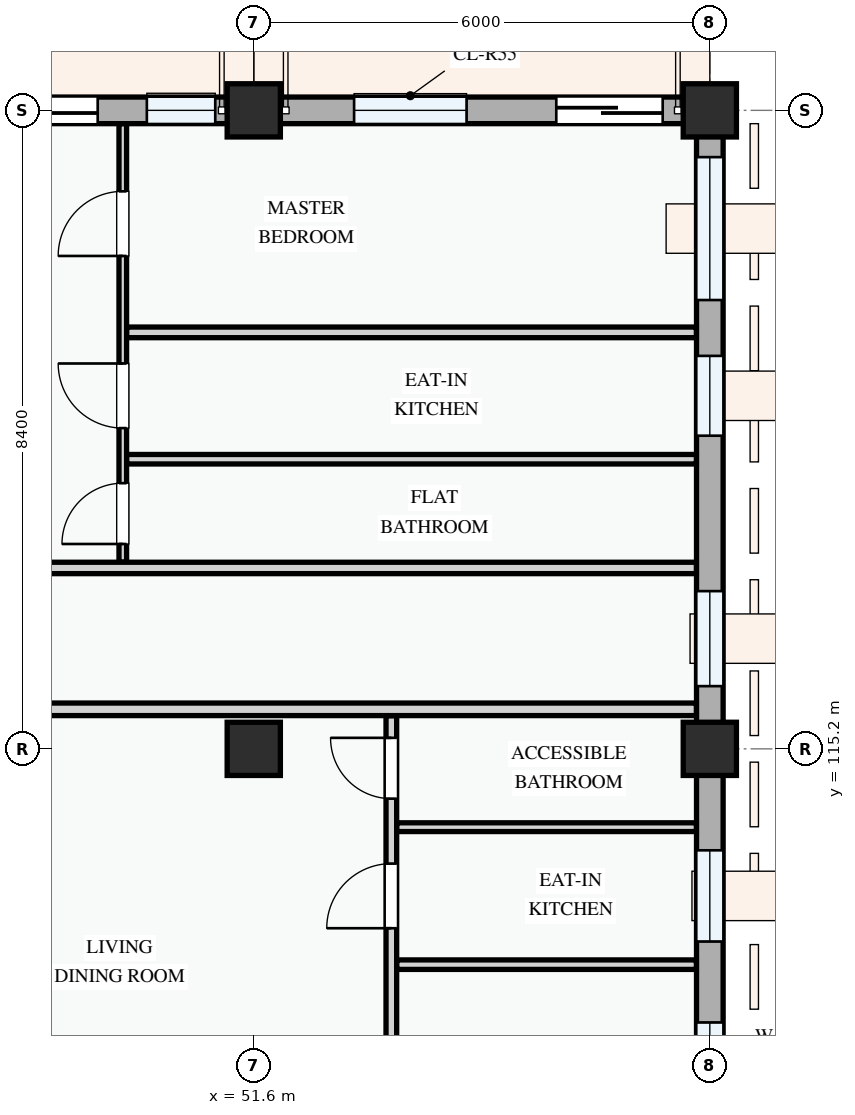
"""IFC4 building model, lengths in metres.
Left out: names, types, materials, properties, quantities, classifications, styles, units other than length and angle.
Written with IfcOpenShell. Run it as: python <this file> out.ifc"""

import sys

from ifc_helpers import new_model, si_unit, direction, frame, frame_2d, origin, origin_2d, place, context, subcontext, project, spatial, rectangle, extrude, element, fill, save


model = new_model("IFC4")
c1 = context("Model", 3, precision=1e-05, world=origin(), true_north=direction((0.0, 1.0)))
c2 = subcontext(c1, "Body", "Model", "MODEL_VIEW")
j1 = project(units=[si_unit("LENGTHUNIT", "METRE"), si_unit("PLANEANGLEUNIT", "RADIAN")], contexts=[c1])
p1 = place(None, origin())
s1 = spatial("IfcSite", under=j1, at=p1, CompositionType="ELEMENT")
p2 = place(p1, origin())
s2 = spatial("IfcBuilding", under=s1, at=p2, CompositionType="ELEMENT")
p3 = place(p2, frame((0.0, 0.0, 14.7)))
s3 = spatial("IfcBuildingStorey", under=s2, at=p3, CompositionType="ELEMENT", Elevation=14.7)
for number, where, z_axis, x_axis in (
    (1, (51.6, 115.2, 0.0), (0.0, 0.0, 1.0), (1.0, 0.0, 0.0)),
    (2, (51.6, 123.6, 0.0), (0.0, 0.0, 1.0), (1.0, 0.0, 0.0)),
    (3, (57.6, 115.2, 0.0), (0.0, 0.0, 1.0), (1.0, 0.0, 0.0)),
    (4, (57.6, 123.6, 0.0), (0.0, 0.0, 1.0), (1.0, 0.0, 0.0)),
):
    element("IfcColumn", number, at=place(p3, frame(where, z_axis=z_axis, x_axis=x_axis)), inside=s3, PredefinedType="COLUMN", context=c2, shape_type="SweptSolid", body=[
        extrude(rectangle(XDim=0.7, YDim=0.7, at=origin_2d()), origin(), (0.0, 0.0, 1.0), 3.3),
    ])
p4 = place(p3, frame((57.6, 109.2, 0.0), z_axis=(0.0, 0.0, 1.0), x_axis=(0.0, 1.0, 0.0)))
e5 = element("IfcWall", 5, at=p4, inside=s3, PredefinedType="STANDARD", context=c2, shape_type="SweptSolid", body=[
    extrude(rectangle(XDim=6.0, YDim=0.35, at=frame_2d((3.0, 0.0))), origin(), (0.0, 0.0, 1.0), 2.575),
])
p5 = place(p4, frame((0.95, 0.0, 0.78)))
e6 = element("IfcOpeningElement", 6, at=p5, cuts=e5, PredefinedType="OPENING", context=c2, shape_type="SweptSolid", body=[
    extrude(rectangle(XDim=1.45, YDim=1.6, at=frame_2d((0.725, 0.8))), frame((0.0, 0.185, 0.0), z_axis=(0.0, -1.0, 0.0), x_axis=(1.0, 0.0, 0.0)), (0.0, 0.0, 1.0), 0.37),
])
p6 = place(p4, frame((3.465, 0.0, 0.78)))
e7 = element("IfcOpeningElement", 7, at=p6, cuts=e5, PredefinedType="OPENING", context=c2, shape_type="SweptSolid", body=[
    extrude(rectangle(XDim=1.2, YDim=1.35, at=frame_2d((0.6, 0.675))), frame((0.0, 0.185, 0.0), z_axis=(0.0, -1.0, 0.0), x_axis=(1.0, 0.0, 0.0)), (0.0, 0.0, 1.0), 0.37),
])
p7 = place(p3, frame((57.6, 115.2, 0.0), z_axis=(0.0, 0.0, 1.0), x_axis=(0.0, 1.0, 0.0)))
e8 = element("IfcWall", 8, at=p7, inside=s3, PredefinedType="STANDARD", context=c2, shape_type="SweptSolid", body=[
    extrude(rectangle(XDim=8.4, YDim=0.35, at=frame_2d((4.2, 0.0))), origin(), (0.0, 0.0, 1.0), 2.425),
])
p8 = place(p7, frame((0.825, 0.0, 0.78)))
e9 = element("IfcOpeningElement", 9, at=p8, cuts=e8, PredefinedType="OPENING", context=c2, shape_type="SweptSolid", body=[
    extrude(rectangle(XDim=1.25, YDim=1.3, at=frame_2d((0.625, 0.65))), frame((0.0, 0.185, 0.0), z_axis=(0.0, -1.0, 0.0), x_axis=(1.0, 0.0, 0.0)), (0.0, 0.0, 1.0), 0.37),
])
p9 = place(p7, frame((4.12, 0.0, 0.78)))
e10 = element("IfcOpeningElement", 10, at=p9, cuts=e8, PredefinedType="OPENING", context=c2, shape_type="SweptSolid", body=[
    extrude(rectangle(XDim=1.05, YDim=1.2, at=frame_2d((0.525, 0.6))), frame((0.0, 0.185, 0.0), z_axis=(0.0, -1.0, 0.0), x_axis=(1.0, 0.0, 0.0)), (0.0, 0.0, 1.0), 0.37),
])
p10 = place(p7, frame((5.905, 0.0, 0.78)))
e11 = element("IfcOpeningElement", 11, at=p10, cuts=e8, PredefinedType="OPENING", context=c2, shape_type="SweptSolid", body=[
    extrude(rectangle(XDim=1.88, YDim=1.52, at=frame_2d((0.94, 0.76))), frame((0.0, 0.185, 0.0), z_axis=(0.0, -1.0, 0.0), x_axis=(1.0, 0.0, 0.0)), (0.0, 0.0, 1.0), 0.37),
])
p11 = place(p3, frame((57.6, 123.6, 0.0), z_axis=(0.0, 0.0, 1.0), x_axis=(-1.0, 0.0, 0.0)))
e12 = element("IfcWall", 12, at=p11, inside=s3, PredefinedType="STANDARD", context=c2, shape_type="SweptSolid", body=[
    extrude(rectangle(XDim=6.0, YDim=0.35, at=frame_2d((3.0, 0.0))), origin(), (0.0, 0.0, 1.0), 2.445),
])
p12 = place(p11, frame((0.62, 0.0, 0.0)))
e13 = element("IfcOpeningElement", 13, at=p12, cuts=e12, PredefinedType="OPENING", context=c2, shape_type="SweptSolid", body=[
    extrude(rectangle(XDim=1.4, YDim=2.2, at=frame_2d((0.7, 1.1))), frame((0.0, 0.185, 0.0), z_axis=(0.0, -1.0, 0.0), x_axis=(1.0, 0.0, 0.0)), (0.0, 0.0, 1.0), 0.37),
])
p13 = place(p11, frame((3.2, 0.0, 0.78)))
e14 = element("IfcOpeningElement", 14, at=p13, cuts=e12, PredefinedType="OPENING", context=c2, shape_type="SweptSolid", body=[
    extrude(rectangle(XDim=1.48, YDim=1.52, at=frame_2d((0.74, 0.76))), frame((0.0, 0.185, 0.0), z_axis=(0.0, -1.0, 0.0), x_axis=(1.0, 0.0, 0.0)), (0.0, 0.0, 1.0), 0.37),
])
p14 = place(p3, frame((51.6, 123.6, 0.0), z_axis=(0.0, 0.0, 1.0), x_axis=(-1.0, 0.0, 0.0)))
e15 = element("IfcWall", 15, at=p14, inside=s3, PredefinedType="STANDARD", context=c2, shape_type="SweptSolid", body=[
    extrude(rectangle(XDim=8.4, YDim=0.35, at=frame_2d((4.2, 0.0))), origin(), (0.0, 0.0, 1.0), 2.345),
])
p15 = place(p14, frame((2.053, 0.0, 0.0)))
e16 = element("IfcOpeningElement", 16, at=p15, cuts=e15, PredefinedType="OPENING", context=c2, shape_type="SweptSolid", body=[
    extrude(rectangle(XDim=1.5, YDim=2.2, at=frame_2d((0.75, 1.1))), frame((0.0, 0.185, 0.0), z_axis=(0.0, -1.0, 0.0), x_axis=(1.0, 0.0, 0.0)), (0.0, 0.0, 1.0), 0.37),
])
p16 = place(p14, frame((0.507, 0.0, 0.78)))
e17 = element("IfcOpeningElement", 17, at=p16, cuts=e15, PredefinedType="OPENING", context=c2, shape_type="SweptSolid", body=[
    extrude(rectangle(XDim=0.9, YDim=1.2, at=frame_2d((0.45, 0.6))), frame((0.0, 0.185, 0.0), z_axis=(0.0, -1.0, 0.0), x_axis=(1.0, 0.0, 0.0)), (0.0, 0.0, 1.0), 0.37),
])
p17 = place(p14, frame((4.137, 0.0, 0.78)))
e18 = element("IfcOpeningElement", 18, at=p17, cuts=e15, PredefinedType="OPENING", context=c2, shape_type="SweptSolid", body=[
    extrude(rectangle(XDim=1.05, YDim=1.2, at=frame_2d((0.525, 0.6))), frame((0.0, 0.185, 0.0), z_axis=(0.0, -1.0, 0.0), x_axis=(1.0, 0.0, 0.0)), (0.0, 0.0, 1.0), 0.37),
])
p18 = place(p14, frame((6.155, 0.0, 0.78)))
e19 = element("IfcOpeningElement", 19, at=p18, cuts=e15, PredefinedType="OPENING", context=c2, shape_type="SweptSolid", body=[
    extrude(rectangle(XDim=1.62, YDim=1.38, at=frame_2d((0.81, 0.69))), frame((0.0, 0.185, 0.0), z_axis=(0.0, -1.0, 0.0), x_axis=(1.0, 0.0, 0.0)), (0.0, 0.0, 1.0), 0.37),
])
p19 = place(p3, frame((53.41, 109.377, 0.0), z_axis=(0.0, 0.0, 1.0), x_axis=(0.0, 1.0, 0.0)))
e20 = element("IfcWall", 20, at=p19, inside=s3, PredefinedType="PARTITIONING", context=c2, shape_type="SweptSolid", body=[
    extrude(rectangle(XDim=6.259, YDim=0.14, at=frame_2d((3.129, 0.0))), origin(), (0.0, 0.0, 1.0), 3.0),
])
p20 = place(p19, frame((1.008, 0.0, 0.0)))
e21 = element("IfcOpeningElement", 21, at=p20, cuts=e20, PredefinedType="OPENING", context=c2, shape_type="SweptSolid", body=[
    extrude(rectangle(XDim=0.85, YDim=2.1, at=frame_2d((0.425, 1.05))), frame((0.0, 0.08, 0.0), z_axis=(0.0, -1.0, 0.0), x_axis=(1.0, 0.0, 0.0)), (0.0, 0.0, 1.0), 0.16),
])
p21 = place(p19, frame((3.463, 0.0, 0.0)))
e22 = element("IfcOpeningElement", 22, at=p21, cuts=e20, PredefinedType="OPENING", context=c2, shape_type="SweptSolid", body=[
    extrude(rectangle(XDim=0.85, YDim=2.1, at=frame_2d((0.425, 1.05))), frame((0.0, 0.08, 0.0), z_axis=(0.0, -1.0, 0.0), x_axis=(1.0, 0.0, 0.0)), (0.0, 0.0, 1.0), 0.16),
])
p22 = place(p19, frame((5.168, 0.0, 0.0)))
e23 = element("IfcOpeningElement", 23, at=p22, cuts=e20, PredefinedType="OPENING", context=c2, shape_type="SweptSolid", body=[
    extrude(rectangle(XDim=0.8, YDim=2.1, at=frame_2d((0.4, 1.05))), frame((0.0, 0.08, 0.0), z_axis=(0.0, -1.0, 0.0), x_axis=(1.0, 0.0, 0.0)), (0.0, 0.0, 1.0), 0.16),
])
p23 = place(p3, frame((53.482, 112.361, 0.0), z_axis=(0.0, 0.0, 1.0), x_axis=(1.0, 0.0, 0.0)))
e24 = element("IfcWall", 24, at=p23, inside=s3, PredefinedType="PARTITIONING", context=c2, shape_type="SweptSolid", body=[
    extrude(rectangle(XDim=3.941, YDim=0.125, at=frame_2d((1.971, 0.0))), origin(), (0.0, 0.0, 1.0), 3.0),
])
p24 = place(p3, frame((53.482, 114.17, 0.0), z_axis=(0.0, 0.0, 1.0), x_axis=(1.0, 0.0, 0.0)))
e25 = element("IfcWall", 25, at=p24, inside=s3, PredefinedType="PARTITIONING", context=c2, shape_type="SweptSolid", body=[
    extrude(rectangle(XDim=3.941, YDim=0.115, at=frame_2d((1.971, 0.0))), origin(), (0.0, 0.0, 1.0), 3.0),
])
p25 = place(p3, frame((49.877, 117.657, 0.0), z_axis=(0.0, 0.0, 1.0), x_axis=(0.0, 1.0, 0.0)))
e26 = element("IfcWall", 26, at=p25, inside=s3, PredefinedType="PARTITIONING", context=c2, shape_type="SweptSolid", body=[
    extrude(rectangle(XDim=5.766, YDim=0.1, at=frame_2d((2.883, 0.0))), origin(), (0.0, 0.0, 1.0), 3.0),
])
p26 = place(p25, frame((0.238, 0.0, 0.0)))
e27 = element("IfcOpeningElement", 27, at=p26, cuts=e26, PredefinedType="OPENING", context=c2, shape_type="SweptSolid", body=[
    extrude(rectangle(XDim=0.8, YDim=2.1, at=frame_2d((0.4, 1.05))), frame((0.0, 0.06, 0.0), z_axis=(0.0, -1.0, 0.0), x_axis=(1.0, 0.0, 0.0)), (0.0, 0.0, 1.0), 0.12),
])
p27 = place(p25, frame((1.763, 0.0, 0.0)))
e28 = element("IfcOpeningElement", 28, at=p27, cuts=e26, PredefinedType="OPENING", context=c2, shape_type="SweptSolid", body=[
    extrude(rectangle(XDim=0.85, YDim=2.1, at=frame_2d((0.425, 1.05))), frame((0.0, 0.06, 0.0), z_axis=(0.0, -1.0, 0.0), x_axis=(1.0, 0.0, 0.0)), (0.0, 0.0, 1.0), 0.12),
])
p28 = place(p25, frame((4.028, 0.0, 0.0)))
e29 = element("IfcOpeningElement", 29, at=p28, cuts=e26, PredefinedType="OPENING", context=c2, shape_type="SweptSolid", body=[
    extrude(rectangle(XDim=0.85, YDim=2.1, at=frame_2d((0.425, 1.05))), frame((0.0, 0.06, 0.0), z_axis=(0.0, -1.0, 0.0), x_axis=(1.0, 0.0, 0.0)), (0.0, 0.0, 1.0), 0.12),
])
p29 = place(p3, frame((49.929, 120.679, 0.0), z_axis=(0.0, 0.0, 1.0), x_axis=(1.0, 0.0, 0.0)))
e30 = element("IfcWall", 30, at=p29, inside=s3, PredefinedType="PARTITIONING", context=c2, shape_type="SweptSolid", body=[
    extrude(rectangle(XDim=7.494, YDim=0.14, at=frame_2d((3.747, 0.0))), origin(), (0.0, 0.0, 1.0), 3.0),
])
p30 = place(p3, frame((49.929, 119.01, 0.0), z_axis=(0.0, 0.0, 1.0), x_axis=(1.0, 0.0, 0.0)))
e31 = element("IfcWall", 31, at=p30, inside=s3, PredefinedType="PARTITIONING", context=c2, shape_type="SweptSolid", body=[
    extrude(rectangle(XDim=7.494, YDim=0.125, at=frame_2d((3.747, 0.0))), origin(), (0.0, 0.0, 1.0), 3.0),
])
p31 = place(p3, frame((25.15, 115.72, 0.0), z_axis=(0.0, 0.0, 1.0), x_axis=(1.0, 0.0, 0.0)))
e32 = element("IfcWall", 32, at=p31, inside=s3, PredefinedType="PARTITIONING", context=c2, shape_type="SweptSolid", body=[
    extrude(rectangle(XDim=32.273, YDim=0.165, at=frame_2d((16.137, 0.0))), origin(), (0.0, 0.0, 1.0), 3.0),
])
p32 = place(p31, frame((0.25, 0.0, 0.0)))
e33 = element("IfcOpeningElement", 33, at=p32, cuts=e32, PredefinedType="OPENING", context=c2, shape_type="SweptSolid", body=[
    extrude(rectangle(XDim=0.92, YDim=2.1, at=frame_2d((0.46, 1.05))), frame((0.0, 0.093, 0.0), z_axis=(0.0, -1.0, 0.0), x_axis=(1.0, 0.0, 0.0)), (0.0, 0.0, 1.0), 0.185),
])
p33 = place(p31, frame((14.015, 0.0, 0.0)))
e34 = element("IfcOpeningElement", 34, at=p33, cuts=e32, PredefinedType="OPENING", context=c2, shape_type="SweptSolid", body=[
    extrude(rectangle(XDim=0.92, YDim=2.1, at=frame_2d((0.46, 1.05))), frame((0.0, 0.093, 0.0), z_axis=(0.0, -1.0, 0.0), x_axis=(1.0, 0.0, 0.0)), (0.0, 0.0, 1.0), 0.185),
])
p34 = place(p31, frame((21.739, 0.0, 0.0)))
e35 = element("IfcOpeningElement", 35, at=p34, cuts=e32, PredefinedType="OPENING", context=c2, shape_type="SweptSolid", body=[
    extrude(rectangle(XDim=0.92, YDim=2.1, at=frame_2d((0.46, 1.05))), frame((0.0, 0.093, 0.0), z_axis=(0.0, -1.0, 0.0), x_axis=(1.0, 0.0, 0.0)), (0.0, 0.0, 1.0), 0.185),
])
p35 = place(p3, frame((22.66, 117.58, 0.0), z_axis=(0.0, 0.0, 1.0), x_axis=(1.0, 0.0, 0.0)))
e36 = element("IfcWall", 36, at=p35, inside=s3, PredefinedType="PARTITIONING", context=c2, shape_type="SweptSolid", body=[
    extrude(rectangle(XDim=34.763, YDim=0.15, at=frame_2d((17.382, 0.0))), origin(), (0.0, 0.0, 1.0), 3.0),
])
p36 = place(p35, frame((2.74, 0.0, 0.0)))
e37 = element("IfcOpeningElement", 37, at=p36, cuts=e36, PredefinedType="OPENING", context=c2, shape_type="SweptSolid", body=[
    extrude(rectangle(XDim=0.96, YDim=2.12, at=frame_2d((0.48, 1.06))), frame((0.0, 0.085, 0.0), z_axis=(0.0, -1.0, 0.0), x_axis=(1.0, 0.0, 0.0)), (0.0, 0.0, 1.0), 0.17),
])
p37 = place(p35, frame((16.285, 0.0, 0.0)))
e38 = element("IfcOpeningElement", 38, at=p37, cuts=e36, PredefinedType="OPENING", context=c2, shape_type="SweptSolid", body=[
    extrude(rectangle(XDim=0.92, YDim=2.1, at=frame_2d((0.46, 1.05))), frame((0.0, 0.085, 0.0), z_axis=(0.0, -1.0, 0.0), x_axis=(1.0, 0.0, 0.0)), (0.0, 0.0, 1.0), 0.17),
])
p38 = place(p35, frame((24.263, 0.0, 0.0)))
e39 = element("IfcOpeningElement", 39, at=p38, cuts=e36, PredefinedType="OPENING", context=c2, shape_type="SweptSolid", body=[
    extrude(rectangle(XDim=0.92, YDim=2.1, at=frame_2d((0.46, 1.05))), frame((0.0, 0.085, 0.0), z_axis=(0.0, -1.0, 0.0), x_axis=(1.0, 0.0, 0.0)), (0.0, 0.0, 1.0), 0.17),
])
p39 = place(p5, origin())
e40 = element("IfcWindow", 40, at=p39, inside=s3, PartitioningType="SINGLE_PANEL", PredefinedType="WINDOW", context=c2, shape_type="SweptSolid", body=[
    extrude(rectangle(XDim=1.45, YDim=1.6, at=frame_2d((0.725, 0.8))), frame((0.0, 0.03, 0.0), z_axis=(0.0, -1.0, 0.0), x_axis=(1.0, 0.0, 0.0)), (0.0, 0.0, 1.0), 0.06),
])
fill(e6, e40)
p40 = place(p6, origin())
e41 = element("IfcWindow", 41, at=p40, inside=s3, PartitioningType="SINGLE_PANEL", PredefinedType="WINDOW", context=c2, shape_type="SweptSolid", body=[
    extrude(rectangle(XDim=1.2, YDim=1.35, at=frame_2d((0.6, 0.675))), frame((0.0, 0.03, 0.0), z_axis=(0.0, -1.0, 0.0), x_axis=(1.0, 0.0, 0.0)), (0.0, 0.0, 1.0), 0.06),
])
fill(e7, e41)
p41 = place(p8, origin())
e42 = element("IfcWindow", 42, at=p41, inside=s3, PartitioningType="SINGLE_PANEL", PredefinedType="WINDOW", context=c2, shape_type="SweptSolid", body=[
    extrude(rectangle(XDim=1.25, YDim=1.3, at=frame_2d((0.625, 0.65))), frame((0.0, 0.03, 0.0), z_axis=(0.0, -1.0, 0.0), x_axis=(1.0, 0.0, 0.0)), (0.0, 0.0, 1.0), 0.06),
])
fill(e9, e42)
p42 = place(p9, origin())
e43 = element("IfcWindow", 43, at=p42, inside=s3, PartitioningType="SINGLE_PANEL", PredefinedType="WINDOW", context=c2, shape_type="SweptSolid", body=[
    extrude(rectangle(XDim=1.05, YDim=1.2, at=frame_2d((0.525, 0.6))), frame((0.0, 0.03, 0.0), z_axis=(0.0, -1.0, 0.0), x_axis=(1.0, 0.0, 0.0)), (0.0, 0.0, 1.0), 0.06),
])
fill(e10, e43)
p43 = place(p10, origin())
e44 = element("IfcWindow", 44, at=p43, inside=s3, PartitioningType="DOUBLE_PANEL_VERTICAL", PredefinedType="WINDOW", context=c2, shape_type="SweptSolid", body=[
    extrude(rectangle(XDim=1.88, YDim=1.52, at=frame_2d((0.94, 0.76))), frame((0.0, 0.03, 0.0), z_axis=(0.0, -1.0, 0.0), x_axis=(1.0, 0.0, 0.0)), (0.0, 0.0, 1.0), 0.06),
])
fill(e11, e44)
p44 = place(p12, frame((1.4, 0.0, 0.0), z_axis=(0.0, 0.0, 1.0), x_axis=(-1.0, 0.0, 0.0)))
e45 = element("IfcDoor", 45, at=p44, inside=s3, OperationType="SLIDING_TO_LEFT", PredefinedType="DOOR", context=c2, shape_type="SweptSolid", body=[
    extrude(rectangle(XDim=1.4, YDim=2.2, at=frame_2d((0.7, 1.1))), frame((0.0, 0.025, 0.0), z_axis=(0.0, -1.0, 0.0), x_axis=(1.0, 0.0, 0.0)), (0.0, 0.0, 1.0), 0.05),
])
fill(e13, e45)
p45 = place(p13, origin())
e46 = element("IfcWindow", 46, at=p45, inside=s3, PartitioningType="SINGLE_PANEL", PredefinedType="WINDOW", context=c2, shape_type="SweptSolid", body=[
    extrude(rectangle(XDim=1.48, YDim=1.52, at=frame_2d((0.74, 0.76))), frame((0.0, 0.03, 0.0), z_axis=(0.0, -1.0, 0.0), x_axis=(1.0, 0.0, 0.0)), (0.0, 0.0, 1.0), 0.06),
])
fill(e14, e46)
p46 = place(p15, frame((1.5, 0.0, 0.0), z_axis=(0.0, 0.0, 1.0), x_axis=(-1.0, 0.0, 0.0)))
e47 = element("IfcDoor", 47, at=p46, inside=s3, OperationType="SLIDING_TO_RIGHT", PredefinedType="DOOR", context=c2, shape_type="SweptSolid", body=[
    extrude(rectangle(XDim=1.5, YDim=2.2, at=frame_2d((0.75, 1.1))), frame((0.0, 0.025, 0.0), z_axis=(0.0, -1.0, 0.0), x_axis=(1.0, 0.0, 0.0)), (0.0, 0.0, 1.0), 0.05),
])
fill(e16, e47)
p47 = place(p16, origin())
e48 = element("IfcWindow", 48, at=p47, inside=s3, PartitioningType="SINGLE_PANEL", PredefinedType="WINDOW", context=c2, shape_type="SweptSolid", body=[
    extrude(rectangle(XDim=0.9, YDim=1.2, at=frame_2d((0.45, 0.6))), frame((0.0, 0.03, 0.0), z_axis=(0.0, -1.0, 0.0), x_axis=(1.0, 0.0, 0.0)), (0.0, 0.0, 1.0), 0.06),
])
fill(e17, e48)
p48 = place(p21, origin())
e49 = element("IfcDoor", 49, at=p48, inside=s3, OperationType="SINGLE_SWING_LEFT", PredefinedType="DOOR", context=c2, shape_type="SweptSolid", body=[
    extrude(rectangle(XDim=0.85, YDim=2.1, at=frame_2d((0.425, 1.05))), frame((0.0, 0.025, 0.0), z_axis=(0.0, -1.0, 0.0), x_axis=(1.0, 0.0, 0.0)), (0.0, 0.0, 1.0), 0.05),
])
fill(e22, e49)
p49 = place(p22, origin())
e50 = element("IfcDoor", 50, at=p49, inside=s3, OperationType="SINGLE_SWING_RIGHT", PredefinedType="DOOR", context=c2, shape_type="SweptSolid", body=[
    extrude(rectangle(XDim=0.8, YDim=2.1, at=frame_2d((0.4, 1.05))), frame((0.0, 0.025, 0.0), z_axis=(0.0, -1.0, 0.0), x_axis=(1.0, 0.0, 0.0)), (0.0, 0.0, 1.0), 0.05),
])
fill(e23, e50)
p50 = place(p26, origin())
e51 = element("IfcDoor", 51, at=p50, inside=s3, OperationType="SINGLE_SWING_LEFT", PredefinedType="DOOR", context=c2, shape_type="SweptSolid", body=[
    extrude(rectangle(XDim=0.8, YDim=2.1, at=frame_2d((0.4, 1.05))), frame((0.0, 0.025, 0.0), z_axis=(0.0, -1.0, 0.0), x_axis=(1.0, 0.0, 0.0)), (0.0, 0.0, 1.0), 0.05),
])
fill(e27, e51)
p51 = place(p27, origin())
e52 = element("IfcDoor", 52, at=p51, inside=s3, OperationType="SINGLE_SWING_RIGHT", PredefinedType="DOOR", context=c2, shape_type="SweptSolid", body=[
    extrude(rectangle(XDim=0.85, YDim=2.1, at=frame_2d((0.425, 1.05))), frame((0.0, 0.025, 0.0), z_axis=(0.0, -1.0, 0.0), x_axis=(1.0, 0.0, 0.0)), (0.0, 0.0, 1.0), 0.05),
])
fill(e28, e52)
p52 = place(p28, origin())
e53 = element("IfcDoor", 53, at=p52, inside=s3, OperationType="SINGLE_SWING_LEFT", PredefinedType="DOOR", context=c2, shape_type="SweptSolid", body=[
    extrude(rectangle(XDim=0.85, YDim=2.1, at=frame_2d((0.425, 1.05))), frame((0.0, 0.025, 0.0), z_axis=(0.0, -1.0, 0.0), x_axis=(1.0, 0.0, 0.0)), (0.0, 0.0, 1.0), 0.05),
])
fill(e29, e53)
save(model, sys.argv[1])
